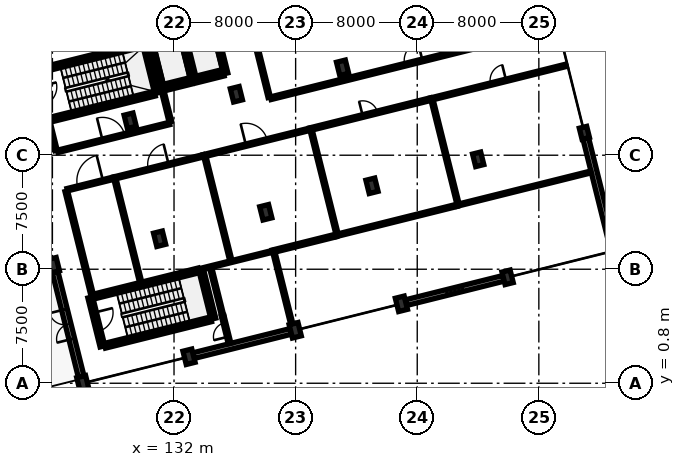
"""IFC4 building model, lengths in metres.
Left out: names, types, materials, properties, quantities, classifications, styles, units other than length and angle.
Written with IfcOpenShell. Run it as: python <this file> out.ifc"""

import sys

from ifc_helpers import new_model, si_unit, direction, frame, frame_2d, origin, origin_2d, place, context, subcontext, project, spatial, rectangle, extrude, element, fill, save


model = new_model("IFC4")
c1 = context("Model", 3, precision=1e-05, world=origin(), true_north=direction((0.0, 1.0)))
c2 = subcontext(c1, "Body", "Model", "MODEL_VIEW")
j1 = project(units=[si_unit("LENGTHUNIT", "METRE"), si_unit("PLANEANGLEUNIT", "RADIAN")], contexts=[c1])
p1 = place(None, origin())
s1 = spatial("IfcSite", under=j1, at=p1, CompositionType="ELEMENT")
p2 = place(p1, origin())
s2 = spatial("IfcBuilding", under=s1, at=p2, CompositionType="ELEMENT")
p3 = place(p2, origin())
s3 = spatial("IfcBuildingStorey", under=s2, at=p3, CompositionType="ELEMENT", Elevation=0.0)
for number, where, z_axis, x_axis in (
    (1, (126.0, 0.8, 0.0), (0.0, 0.0, 1.0), (0.97, 0.242, 0.0)),
    (2, (124.065, 8.562, 0.0), (0.0, 0.0, 1.0), (0.97, 0.242, 0.0)),
    (3, (132.986, 2.542, 0.0), (0.0, 0.0, 1.0), (0.97, 0.242, 0.0)),
    (4, (131.051, 10.304, 0.0), (0.0, 0.0, 1.0), (0.97, 0.242, 0.0)),
    (5, (129.115, 18.067, 0.0), (0.0, 0.0, 1.0), (0.97, 0.242, 0.0)),
    (6, (139.972, 4.284, 0.0), (0.0, 0.0, 1.0), (0.97, 0.242, 0.0)),
    (7, (138.037, 12.046, 0.0), (0.0, 0.0, 1.0), (0.97, 0.242, 0.0)),
    (8, (136.102, 19.808, 0.0), (0.0, 0.0, 1.0), (0.97, 0.242, 0.0)),
    (9, (146.958, 6.026, 0.0), (0.0, 0.0, 1.0), (0.97, 0.242, 0.0)),
    (10, (145.023, 13.788, 0.0), (0.0, 0.0, 1.0), (0.97, 0.242, 0.0)),
    (11, (143.088, 21.55, 0.0), (0.0, 0.0, 1.0), (0.97, 0.242, 0.0)),
):
    element("IfcColumn", number, at=place(p3, frame(where, z_axis=z_axis, x_axis=x_axis)), inside=s3, PredefinedType="COLUMN", context=c2, shape_type="SweptSolid", body=[
        extrude(rectangle(XDim=0.6, YDim=0.9, at=origin_2d()), origin(), (0.0, 0.0, 1.0), 4.7),
    ])
for number, where, z_axis, x_axis in (
    (12, (153.945, 7.767, 0.0), (0.0, 0.0, 1.0), (0.97, 0.242, 0.0)),
    (13, (152.009, 15.53, 0.0), (0.0, 0.0, 1.0), (0.97, 0.242, 0.0)),
):
    element("IfcColumn", number, at=place(p3, frame(where, z_axis=z_axis, x_axis=x_axis)), inside=s3, PredefinedType="COLUMN", context=c2, shape_type="SweptSolid", body=[
        extrude(rectangle(XDim=0.55, YDim=0.85, at=origin_2d()), origin(), (0.0, 0.0, 1.0), 4.7),
    ])
p4 = place(p3, frame((158.995, 17.271, 0.0), z_axis=(0.0, 0.0, 1.0), x_axis=(0.970295726276, 0.2419218956, 0.0)))
e14 = element("IfcColumn", 14, at=p4, inside=s3, PredefinedType="COLUMN", context=c2, shape_type="SweptSolid", body=[
    extrude(rectangle(XDim=0.5, YDim=0.75, at=origin_2d()), origin(), (0.0, 0.0, 1.0), 4.7),
])
p5 = place(p3, frame((159.086, 16.908, 0.0), z_axis=(0.0, 0.0, 1.0), x_axis=(0.241917549853, -0.970296809782, 0.0)))
e15 = element("IfcWall", 15, at=p5, inside=s3, PredefinedType="SOLIDWALL", context=c2, shape_type="SweptSolid", body=[
    extrude(rectangle(XDim=7.25, YDim=0.38, at=frame_2d((3.625, 0.0))), origin(), (0.0, 0.0, 1.0), 3.985),
])
p6 = place(p3, frame((153.678, 7.701, 0.0), z_axis=(0.0, 0.0, 1.0), x_axis=(-0.970294050816, -0.241928615405, 0.0)))
e16 = element("IfcWall", 16, at=p6, inside=s3, PredefinedType="SOLIDWALL", context=c2, shape_type="SweptSolid", body=[
    extrude(rectangle(XDim=6.625, YDim=0.38, at=frame_2d((3.312, 0.0))), origin(), (0.0, 0.0, 1.0), 3.885),
])
p7 = place(p6, frame((2.762, 0.0, 0.9)))
e17 = element("IfcOpeningElement", 17, at=p7, cuts=e16, PredefinedType="OPENING", context=c2, shape_type="SweptSolid", body=[
    extrude(rectangle(XDim=1.1, YDim=1.9, at=frame_2d((0.55, 0.95))), frame((0.0, 0.202, 0.0), z_axis=(0.0, -1.0, 0.0), x_axis=(1.0, 0.0, 0.0)), (0.0, 0.0, 1.0), 0.404),
])
p8 = place(p3, frame((139.681, 4.211, 0.0), z_axis=(0.0, 0.0, 1.0), x_axis=(-0.970296792907, -0.241917617537, 0.0)))
e18 = element("IfcWall", 18, at=p8, inside=s3, PredefinedType="SOLIDWALL", context=c2, shape_type="SweptSolid", body=[
    extrude(rectangle(XDim=6.6, YDim=0.38, at=frame_2d((3.3, 0.0))), origin(), (0.0, 0.0, 1.0), 3.885),
])
p9 = place(p3, frame((125.891, 1.237, 0.0), z_axis=(0.0, 0.0, 1.0), x_axis=(-0.241904492141, 0.97030006528, 0.0)))
e19 = element("IfcWall", 19, at=p9, inside=s3, PredefinedType="SOLIDWALL", context=c2, shape_type="SweptSolid", body=[
    extrude(rectangle(XDim=7.1, YDim=0.38, at=frame_2d((3.55, 0.0))), origin(), (0.0, 0.0, 1.0), 3.985),
])
p10 = place(p9, frame((2.55, 0.0, 0.0)))
e20 = element("IfcOpeningElement", 20, at=p10, cuts=e19, PredefinedType="OPENING", context=c2, shape_type="SweptSolid", body=[
    extrude(rectangle(XDim=2.0, YDim=2.35, at=frame_2d((1.0, 1.175))), frame((0.0, 0.202, 0.0), z_axis=(0.0, -1.0, 0.0), x_axis=(1.0, 0.0, 0.0)), (0.0, 0.0, 1.0), 0.404),
])
p11 = place(p3, frame((123.75, 18.11, 0.0), z_axis=(0.0, 0.0, 1.0), x_axis=(0.970294108333, 0.241928384724, 0.0)))
e21 = element("IfcWall", 21, at=p11, inside=s3, PredefinedType="SHEAR", context=c2, shape_type="SweptSolid", body=[
    extrude(rectangle(XDim=7.19, YDim=0.32, at=frame_2d((3.595, 0.0))), origin(), (0.0, 0.0, 1.0), 4.7),
])
p12 = place(p3, frame((130.887, 19.889, 0.0), z_axis=(0.0, 0.0, 1.0), x_axis=(-0.241947258837, 0.970289402158, 0.0)))
e22 = element("IfcWall", 22, at=p12, inside=s3, PredefinedType="SHEAR", context=c2, shape_type="SweptSolid", body=[
    extrude(rectangle(XDim=3.32, YDim=0.32, at=frame_2d((1.66, 0.0))), origin(), (0.0, 0.0, 1.0), 4.7),
])
p13 = place(p3, frame((129.924, 23.071, 0.0), z_axis=(0.0, 0.0, 1.0), x_axis=(-0.970294108333, -0.241928384724, 0.0)))
e23 = element("IfcWall", 23, at=p13, inside=s3, PredefinedType="SHEAR", context=c2, shape_type="SweptSolid", body=[
    extrude(rectangle(XDim=7.19, YDim=0.32, at=frame_2d((3.595, 0.0))), origin(), (0.0, 0.0, 1.0), 4.7),
])
p14 = place(p3, frame((131.363, 20.176, 0.0), z_axis=(0.0, 0.0, 1.0), x_axis=(0.970284587517, 0.241966566341, 0.0)))
e24 = element("IfcWall", 24, at=p14, inside=s3, PredefinedType="SHEAR", context=c2, shape_type="SweptSolid", body=[
    extrude(rectangle(XDim=1.817, YDim=0.28, at=frame_2d((0.909, 0.0))), origin(), (0.0, 0.0, 1.0), 4.7),
])
for number, where, z_axis, x_axis in (
    (25, (133.267, 20.651, 0.0), (0.0, 0.0, 1.0), (-0.242, 0.97, 0.0)),
    (26, (130.498, 23.046, 0.0), (0.0, 0.0, 1.0), (0.242, -0.97, 0.0)),
):
    element("IfcWall", number, at=place(p3, frame(where, z_axis=z_axis, x_axis=x_axis)), inside=s3, PredefinedType="SHEAR", context=c2, shape_type="SweptSolid", body=[
        extrude(rectangle(XDim=2.994, YDim=0.28, at=frame_2d((1.497, 0.0))), origin(), (0.0, 0.0, 1.0), 4.7),
    ])
p15 = place(p3, frame((133.408, 20.686, 0.0), z_axis=(0.0, 0.0, 1.0), x_axis=(0.970285190026, 0.241964150272, 0.0)))
e27 = element("IfcWall", 27, at=p15, inside=s3, PredefinedType="SHEAR", context=c2, shape_type="SweptSolid", body=[
    extrude(rectangle(XDim=1.91, YDim=0.28, at=frame_2d((0.955, 0.0))), origin(), (0.0, 0.0, 1.0), 4.7),
])
p16 = place(p3, frame((135.402, 21.183, 0.0), z_axis=(0.0, 0.0, 1.0), x_axis=(-0.241921647353, 0.970295788171, 0.0)))
e28 = element("IfcWall", 28, at=p16, inside=s3, PredefinedType="SHEAR", context=c2, shape_type="SweptSolid", body=[
    extrude(rectangle(XDim=2.994, YDim=0.28, at=frame_2d((1.497, 0.0))), origin(), (0.0, 0.0, 1.0), 4.7),
])
p17 = place(p3, frame((127.452, 3.264, 0.0), z_axis=(0.0, 0.0, 1.0), x_axis=(0.970294108333, 0.241928384724, 0.0)))
e29 = element("IfcWall", 29, at=p17, inside=s3, PredefinedType="SHEAR", context=c2, shape_type="SweptSolid", body=[
    extrude(rectangle(XDim=7.19, YDim=0.32, at=frame_2d((3.595, 0.0))), origin(), (0.0, 0.0, 1.0), 4.7),
])
p18 = place(p3, frame((134.588, 5.044, 0.0), z_axis=(0.0, 0.0, 1.0), x_axis=(-0.241929995817, 0.970293706629, 0.0)))
e30 = element("IfcWall", 30, at=p18, inside=s3, PredefinedType="SHEAR", context=c2, shape_type="SweptSolid", body=[
    extrude(rectangle(XDim=3.32, YDim=0.32, at=frame_2d((1.66, 0.0))), origin(), (0.0, 0.0, 1.0), 4.7),
])
p19 = place(p3, frame((133.625, 8.225, 0.0), z_axis=(0.0, 0.0, 1.0), x_axis=(-0.970294108333, -0.241928384724, 0.0)))
e31 = element("IfcWall", 31, at=p19, inside=s3, PredefinedType="SHEAR", context=c2, shape_type="SweptSolid", body=[
    extrude(rectangle(XDim=7.19, YDim=0.32, at=frame_2d((3.595, 0.0))), origin(), (0.0, 0.0, 1.0), 4.7),
])
p20 = place(p3, frame((126.489, 6.446, 0.0), z_axis=(0.0, 0.0, 1.0), x_axis=(0.241947258837, -0.970289402158, 0.0)))
e32 = element("IfcWall", 32, at=p20, inside=s3, PredefinedType="SHEAR", context=c2, shape_type="SweptSolid", body=[
    extrude(rectangle(XDim=3.32, YDim=0.32, at=frame_2d((1.66, 0.0))), origin(), (0.0, 0.0, 1.0), 4.7),
])
p21 = place(p20, frame((1.035, 0.0, 0.0)))
e33 = element("IfcOpeningElement", 33, at=p21, cuts=e32, PredefinedType="OPENING", context=c2, shape_type="SweptSolid", body=[
    extrude(rectangle(XDim=1.25, YDim=2.2, at=frame_2d((0.625, 1.1))), frame((0.0, 0.172, 0.0), z_axis=(0.0, -1.0, 0.0), x_axis=(1.0, 0.0, 0.0)), (0.0, 0.0, 1.0), 0.344),
])
p22 = place(p3, frame((124.346, 16.053, 0.0), z_axis=(0.0, 0.0, 1.0), x_axis=(0.970295772287, 0.241921711059, 0.0)))
e34 = element("IfcWall", 34, at=p22, inside=s3, PredefinedType="PARTITIONING", context=c2, shape_type="SweptSolid", body=[
    extrude(rectangle(XDim=7.58, YDim=0.16, at=frame_2d((3.79, 0.0))), origin(), (0.0, 0.0, 1.0), 3.885),
])
p23 = place(p22, frame((3.04, 0.0, 0.0)))
e35 = element("IfcOpeningElement", 35, at=p23, cuts=e34, PredefinedType="OPENING", context=c2, shape_type="SweptSolid", body=[
    extrude(rectangle(XDim=1.5, YDim=2.28, at=frame_2d((0.75, 1.14))), frame((0.0, 0.092, 0.0), z_axis=(0.0, -1.0, 0.0), x_axis=(1.0, 0.0, 0.0)), (0.0, 0.0, 1.0), 0.184),
])
p24 = place(p3, frame((135.654, 3.415, 0.0), z_axis=(0.0, 0.0, 1.0), x_axis=(-0.2419188687, 0.970296480962, 0.0)))
e36 = element("IfcWall", 36, at=p24, inside=s3, PredefinedType="PARTITIONING", context=c2, shape_type="SweptSolid", body=[
    extrude(rectangle(XDim=1.863, YDim=0.18, at=frame_2d((0.932, 0.0))), origin(), (0.0, 0.0, 1.0), 4.035),
])
p25 = place(p24, frame((0.457, 0.0, 0.0)))
e37 = element("IfcOpeningElement", 37, at=p25, cuts=e36, PredefinedType="OPENING", context=c2, shape_type="SweptSolid", body=[
    extrude(rectangle(XDim=0.95, YDim=2.15, at=frame_2d((0.475, 1.075))), frame((0.0, 0.102, 0.0), z_axis=(0.0, -1.0, 0.0), x_axis=(1.0, 0.0, 0.0)), (0.0, 0.0, 1.0), 0.204),
])
p26 = place(p3, frame((124.975, 13.53, 0.0), z_axis=(0.0, 0.0, 1.0), x_axis=(0.970289141252, 0.241948305158, 0.0)))
e38 = element("IfcWall", 38, at=p26, inside=s3, PredefinedType="PARTITIONING", context=c2, shape_type="SweptSolid", body=[
    extrude(rectangle(XDim=3.13, YDim=0.16, at=frame_2d((1.565, 0.0))), origin(), (0.0, 0.0, 1.0), 4.7),
])
p27 = place(p26, frame((0.705, 0.0, 0.0)))
e39 = element("IfcOpeningElement", 39, at=p27, cuts=e38, PredefinedType="OPENING", context=c2, shape_type="SweptSolid", body=[
    extrude(rectangle(XDim=1.72, YDim=2.34, at=frame_2d((0.86, 1.17))), frame((0.0, 0.092, 0.0), z_axis=(0.0, -1.0, 0.0), x_axis=(1.0, 0.0, 0.0)), (0.0, 0.0, 1.0), 0.184),
])
p28 = place(p3, frame((128.023, 14.29, 0.0), z_axis=(0.0, 0.0, 1.0), x_axis=(0.970293282145, 0.241931698263, 0.0)))
e40 = element("IfcWall", 40, at=p28, inside=s3, PredefinedType="PARTITIONING", context=c2, shape_type="SweptSolid", body=[
    extrude(rectangle(XDim=6.088, YDim=0.16, at=frame_2d((3.044, 0.0))), origin(), (0.0, 0.0, 1.0), 3.885),
])
p29 = place(p28, frame((2.354, 0.0, 0.0)))
e41 = element("IfcOpeningElement", 41, at=p29, cuts=e40, PredefinedType="OPENING", context=c2, shape_type="SweptSolid", body=[
    extrude(rectangle(XDim=1.38, YDim=2.3, at=frame_2d((0.69, 1.15))), frame((0.0, 0.092, 0.0), z_axis=(0.0, -1.0, 0.0), x_axis=(1.0, 0.0, 0.0)), (0.0, 0.0, 1.0), 0.184),
])
p30 = place(p3, frame((133.942, 15.766, 0.0), z_axis=(0.0, 0.0, 1.0), x_axis=(0.970292162734, 0.241936187739, 0.0)))
e42 = element("IfcWall", 42, at=p30, inside=s3, PredefinedType="PARTITIONING", context=c2, shape_type="SweptSolid", body=[
    extrude(rectangle(XDim=7.188, YDim=0.16, at=frame_2d((3.594, 0.0))), origin(), (0.0, 0.0, 1.0), 3.885),
])
p31 = place(p30, frame((2.874, 0.0, 0.0)))
e43 = element("IfcOpeningElement", 43, at=p31, cuts=e42, PredefinedType="OPENING", context=c2, shape_type="SweptSolid", body=[
    extrude(rectangle(XDim=1.44, YDim=2.32, at=frame_2d((0.72, 1.16))), frame((0.0, 0.092, 0.0), z_axis=(0.0, -1.0, 0.0), x_axis=(1.0, 0.0, 0.0)), (0.0, 0.0, 1.0), 0.184),
])
p32 = place(p3, frame((140.928, 17.508, 0.0), z_axis=(0.0, 0.0, 1.0), x_axis=(0.970293149657, 0.241932229621, 0.0)))
e44 = element("IfcWall", 44, at=p32, inside=s3, PredefinedType="PARTITIONING", context=c2, shape_type="SweptSolid", body=[
    extrude(rectangle(XDim=8.188, YDim=0.18, at=frame_2d((4.094, 0.0))), origin(), (0.0, 0.0, 1.0), 3.885),
])
p33 = place(p32, frame((3.594, 0.0, 0.0)))
e45 = element("IfcOpeningElement", 45, at=p33, cuts=e44, PredefinedType="OPENING", context=c2, shape_type="SweptSolid", body=[
    extrude(rectangle(XDim=1.0, YDim=2.15, at=frame_2d((0.5, 1.075))), frame((0.0, 0.102, 0.0), z_axis=(0.0, -1.0, 0.0), x_axis=(1.0, 0.0, 0.0)), (0.0, 0.0, 1.0), 0.204),
])
p34 = place(p3, frame((148.885, 19.491, 0.0), z_axis=(0.0, 0.0, 1.0), x_axis=(0.970294203895, 0.241928001454, 0.0)))
e46 = element("IfcWall", 46, at=p34, inside=s3, PredefinedType="PARTITIONING", context=c2, shape_type="SweptSolid", body=[
    extrude(rectangle(XDim=9.171, YDim=0.16, at=frame_2d((4.585, 0.0))), origin(), (0.0, 0.0, 1.0), 3.885),
])
p35 = place(p34, frame((4.061, 0.0, 0.0)))
e47 = element("IfcOpeningElement", 47, at=p35, cuts=e46, PredefinedType="OPENING", context=c2, shape_type="SweptSolid", body=[
    extrude(rectangle(XDim=1.05, YDim=2.15, at=frame_2d((0.525, 1.075))), frame((0.0, 0.092, 0.0), z_axis=(0.0, -1.0, 0.0), x_axis=(1.0, 0.0, 0.0)), (0.0, 0.0, 1.0), 0.184),
])
p36 = place(p3, frame((138.367, 19.549, 0.0), z_axis=(0.0, 0.0, 1.0), x_axis=(0.970295834183, 0.241921462809, 0.0)))
e48 = element("IfcWall", 48, at=p36, inside=s3, PredefinedType="PARTITIONING", context=c2, shape_type="SweptSolid", body=[
    extrude(rectangle(XDim=19.363, YDim=0.18, at=frame_2d((9.682, 0.0))), origin(), (0.0, 0.0, 1.0), 3.885),
])
p37 = place(p36, frame((9.082, 0.0, 0.0)))
e49 = element("IfcOpeningElement", 49, at=p37, cuts=e48, PredefinedType="OPENING", context=c2, shape_type="SweptSolid", body=[
    extrude(rectangle(XDim=1.2, YDim=2.15, at=frame_2d((0.6, 1.075))), frame((0.0, 0.102, 0.0), z_axis=(0.0, -1.0, 0.0), x_axis=(1.0, 0.0, 0.0)), (0.0, 0.0, 1.0), 0.204),
])
p38 = place(p3, frame((124.243, 16.115, 0.0), z_axis=(0.0, 0.0, 1.0), x_axis=(-0.24202255973, 0.970270622343, 0.0)))
e50 = element("IfcWall", 50, at=p38, inside=s3, PredefinedType="PARTITIONING", context=c2, shape_type="SweptSolid", body=[
    extrude(rectangle(XDim=1.792, YDim=0.15, at=frame_2d((0.896, 0.0))), origin(), (0.0, 0.0, 1.0), 3.985),
])
p39 = place(p3, frame((131.763, 17.99, 0.0), z_axis=(0.0, 0.0, 1.0), x_axis=(-0.241962612769, 0.970285573438, 0.0)))
e51 = element("IfcWall", 51, at=p39, inside=s3, PredefinedType="PARTITIONING", context=c2, shape_type="SweptSolid", body=[
    extrude(rectangle(XDim=2.206, YDim=0.18, at=frame_2d((1.103, 0.0))), origin(), (0.0, 0.0, 1.0), 3.985),
])
p40 = place(p3, frame((133.627, 8.267, 0.0), z_axis=(0.0, 0.0, 1.0), x_axis=(0.970303519327, 0.241890637233, 0.0)))
e52 = element("IfcWall", 52, at=p40, inside=s3, PredefinedType="PARTITIONING", context=c2, shape_type="SweptSolid", body=[
    extrude(rectangle(XDim=4.988, YDim=0.125, at=frame_2d((2.494, 0.0))), origin(), (0.0, 0.0, 1.0), 2.3),
])
p41 = place(p3, frame((135.2, 5.235, 0.0), z_axis=(0.0, 0.0, 1.0), x_axis=(-0.241934312689, 0.970292630263, 0.0)))
e53 = element("IfcWall", 53, at=p41, inside=s3, PredefinedType="PARTITIONING", context=c2, shape_type="SweptSolid", body=[
    extrude(rectangle(XDim=3.248, YDim=0.15, at=frame_2d((1.624, 0.0))), origin(), (0.0, 0.0, 1.0), 4.7),
])
p42 = place(p3, frame((139.766, 4.615, 0.0), z_axis=(0.0, 0.0, 1.0), x_axis=(-0.241908041606, 0.970299180359, 0.0)))
e54 = element("IfcWall", 54, at=p42, inside=s3, PredefinedType="PARTITIONING", context=c2, shape_type="SweptSolid", body=[
    extrude(rectangle(XDim=4.943, YDim=0.15, at=frame_2d((2.472, 0.0))), origin(), (0.0, 0.0, 1.0), 3.885),
])
p43 = place(p3, frame((126.58, 6.74, 0.0), z_axis=(0.0, 0.0, 1.0), x_axis=(-0.24192707633, 0.97029443456, 0.0)))
e55 = element("IfcWall", 55, at=p43, inside=s3, PredefinedType="PARTITIONING", context=c2, shape_type="SweptSolid", body=[
    extrude(rectangle(XDim=6.892, YDim=0.18, at=frame_2d((3.446, 0.0))), origin(), (0.0, 0.0, 1.0), 3.985),
])
p44 = place(p3, frame((129.804, 7.45, 0.0), z_axis=(0.0, 0.0, 1.0), x_axis=(-0.241901504068, 0.970300810228, 0.0)))
e56 = element("IfcWall", 56, at=p44, inside=s3, PredefinedType="PARTITIONING", context=c2, shape_type="SweptSolid", body=[
    extrude(rectangle(XDim=6.976, YDim=0.15, at=frame_2d((3.488, 0.0))), origin(), (0.0, 0.0, 1.0), 3.985),
])
p45 = place(p3, frame((135.737, 8.87, 0.0), z_axis=(0.0, 0.0, 1.0), x_axis=(-0.241939357675, 0.970291372325, 0.0)))
e57 = element("IfcWall", 57, at=p45, inside=s3, PredefinedType="PARTITIONING", context=c2, shape_type="SweptSolid", body=[
    extrude(rectangle(XDim=7.033, YDim=0.15, at=frame_2d((3.517, 0.0))), origin(), (0.0, 0.0, 1.0), 3.985),
])
p46 = place(p3, frame((138.479, 9.477, 0.0), z_axis=(0.0, 0.0, 1.0), x_axis=(0.970295647322, 0.241922212266, 0.0)))
e58 = element("IfcWall", 58, at=p46, inside=s3, PredefinedType="PARTITIONING", context=c2, shape_type="SweptSolid", body=[
    extrude(rectangle(XDim=4.308, YDim=0.18, at=frame_2d((2.154, 0.0))), origin(), (0.0, 0.0, 1.0), 3.885),
])
p47 = place(p3, frame((142.72, 10.622, 0.0), z_axis=(0.0, 0.0, 1.0), x_axis=(-0.241913043167, 0.970297933393, 0.0)))
e59 = element("IfcWall", 59, at=p47, inside=s3, PredefinedType="PARTITIONING", context=c2, shape_type="SweptSolid", body=[
    extrude(rectangle(XDim=7.013, YDim=0.15, at=frame_2d((3.506, 0.0))), origin(), (0.0, 0.0, 1.0), 3.985),
])
p48 = place(p3, frame((142.67, 10.522, 0.0), z_axis=(0.0, 0.0, 1.0), x_axis=(0.970298403727, 0.241911156677, 0.0)))
e60 = element("IfcWall", 60, at=p48, inside=s3, PredefinedType="PARTITIONING", context=c2, shape_type="SweptSolid", body=[
    extrude(rectangle(XDim=8.188, YDim=0.15, at=frame_2d((4.094, 0.0))), origin(), (0.0, 0.0, 1.0), 3.885),
])
p49 = place(p3, frame((150.677, 12.605, 0.0), z_axis=(0.0, 0.0, 1.0), x_axis=(-0.241913935588, 0.970297710895, 0.0)))
e61 = element("IfcWall", 61, at=p49, inside=s3, PredefinedType="PARTITIONING", context=c2, shape_type="SweptSolid", body=[
    extrude(rectangle(XDim=7.023, YDim=0.15, at=frame_2d((3.511, 0.0))), origin(), (0.0, 0.0, 1.0), 3.985),
])
p50 = place(p3, frame((150.627, 12.505, 0.0), z_axis=(0.0, 0.0, 1.0), x_axis=(0.970292717865, 0.241933961357, 0.0)))
e62 = element("IfcWall", 62, at=p50, inside=s3, PredefinedType="PARTITIONING", context=c2, shape_type="SweptSolid", body=[
    extrude(rectangle(XDim=9.071, YDim=0.125, at=frame_2d((4.536, 0.0))), origin(), (0.0, 0.0, 1.0), 3.885),
])
p51 = place(p3, frame((138.264, 19.611, 0.0), z_axis=(0.0, 0.0, 1.0), x_axis=(-0.241920353256, 0.970296110824, 0.0)))
e63 = element("IfcWall", 63, at=p51, inside=s3, PredefinedType="PARTITIONING", context=c2, shape_type="SweptSolid", body=[
    extrude(rectangle(XDim=8.03, YDim=0.16, at=frame_2d((4.015, 0.0))), origin(), (0.0, 0.0, 1.0), 3.985),
])
p52 = place(p7, origin())
e64 = element("IfcWindow", 64, at=p52, inside=s3, PartitioningType="SINGLE_PANEL", PredefinedType="WINDOW", context=c2, shape_type="SweptSolid", body=[
    extrude(rectangle(XDim=1.1, YDim=1.9, at=frame_2d((0.55, 0.95))), frame((0.0, 0.03, 0.0), z_axis=(0.0, -1.0, 0.0), x_axis=(1.0, 0.0, 0.0)), (0.0, 0.0, 1.0), 0.06),
])
fill(e17, e64)
p53 = place(p10, origin())
e65 = element("IfcDoor", 65, at=p53, inside=s3, OperationType="DOUBLE_DOOR_SINGLE_SWING", PredefinedType="DOOR", context=c2, shape_type="SweptSolid", body=[
    extrude(rectangle(XDim=2.0, YDim=2.35, at=frame_2d((1.0, 1.175))), frame((0.0, 0.025, 0.0), z_axis=(0.0, -1.0, 0.0), x_axis=(1.0, 0.0, 0.0)), (0.0, 0.0, 1.0), 0.05),
])
fill(e20, e65)
p54 = place(p21, origin())
e66 = element("IfcDoor", 66, at=p54, inside=s3, OperationType="SINGLE_SWING_LEFT", PredefinedType="DOOR", context=c2, shape_type="SweptSolid", body=[
    extrude(rectangle(XDim=1.25, YDim=2.2, at=frame_2d((0.625, 1.1))), frame((0.0, 0.025, 0.0), z_axis=(0.0, -1.0, 0.0), x_axis=(1.0, 0.0, 0.0)), (0.0, 0.0, 1.0), 0.05),
])
fill(e33, e66)
p55 = place(p23, origin())
e67 = element("IfcDoor", 67, at=p55, inside=s3, OperationType="SINGLE_SWING_LEFT", PredefinedType="DOOR", context=c2, shape_type="SweptSolid", body=[
    extrude(rectangle(XDim=1.5, YDim=2.28, at=frame_2d((0.75, 1.14))), frame((0.0, 0.025, 0.0), z_axis=(0.0, -1.0, 0.0), x_axis=(1.0, 0.0, 0.0)), (0.0, 0.0, 1.0), 0.05),
])
fill(e35, e67)
p56 = place(p25, origin())
e68 = element("IfcDoor", 68, at=p56, inside=s3, OperationType="SINGLE_SWING_LEFT", PredefinedType="DOOR", context=c2, shape_type="SweptSolid", body=[
    extrude(rectangle(XDim=0.95, YDim=2.15, at=frame_2d((0.475, 1.075))), frame((0.0, 0.025, 0.0), z_axis=(0.0, -1.0, 0.0), x_axis=(1.0, 0.0, 0.0)), (0.0, 0.0, 1.0), 0.05),
])
fill(e37, e68)
p57 = place(p27, origin())
e69 = element("IfcDoor", 69, at=p57, inside=s3, OperationType="SINGLE_SWING_RIGHT", PredefinedType="DOOR", context=c2, shape_type="SweptSolid", body=[
    extrude(rectangle(XDim=1.72, YDim=2.34, at=frame_2d((0.86, 1.17))), frame((0.0, 0.025, 0.0), z_axis=(0.0, -1.0, 0.0), x_axis=(1.0, 0.0, 0.0)), (0.0, 0.0, 1.0), 0.05),
])
fill(e39, e69)
p58 = place(p29, origin())
e70 = element("IfcDoor", 70, at=p58, inside=s3, OperationType="SINGLE_SWING_RIGHT", PredefinedType="DOOR", context=c2, shape_type="SweptSolid", body=[
    extrude(rectangle(XDim=1.38, YDim=2.3, at=frame_2d((0.69, 1.15))), frame((0.0, 0.025, 0.0), z_axis=(0.0, -1.0, 0.0), x_axis=(1.0, 0.0, 0.0)), (0.0, 0.0, 1.0), 0.05),
])
fill(e41, e70)
p59 = place(p31, origin())
e71 = element("IfcDoor", 71, at=p59, inside=s3, OperationType="SINGLE_SWING_LEFT", PredefinedType="DOOR", context=c2, shape_type="SweptSolid", body=[
    extrude(rectangle(XDim=1.44, YDim=2.32, at=frame_2d((0.72, 1.16))), frame((0.0, 0.025, 0.0), z_axis=(0.0, -1.0, 0.0), x_axis=(1.0, 0.0, 0.0)), (0.0, 0.0, 1.0), 0.05),
])
fill(e43, e71)
p60 = place(p33, origin())
e72 = element("IfcDoor", 72, at=p60, inside=s3, OperationType="SINGLE_SWING_LEFT", PredefinedType="DOOR", context=c2, shape_type="SweptSolid", body=[
    extrude(rectangle(XDim=1.0, YDim=2.15, at=frame_2d((0.5, 1.075))), frame((0.0, 0.025, 0.0), z_axis=(0.0, -1.0, 0.0), x_axis=(1.0, 0.0, 0.0)), (0.0, 0.0, 1.0), 0.05),
])
fill(e45, e72)
p61 = place(p35, origin())
e73 = element("IfcDoor", 73, at=p61, inside=s3, OperationType="SINGLE_SWING_RIGHT", PredefinedType="DOOR", context=c2, shape_type="SweptSolid", body=[
    extrude(rectangle(XDim=1.05, YDim=2.15, at=frame_2d((0.525, 1.075))), frame((0.0, 0.025, 0.0), z_axis=(0.0, -1.0, 0.0), x_axis=(1.0, 0.0, 0.0)), (0.0, 0.0, 1.0), 0.05),
])
fill(e47, e73)
p62 = place(p37, origin())
e74 = element("IfcDoor", 74, at=p62, inside=s3, OperationType="SINGLE_SWING_RIGHT", PredefinedType="DOOR", context=c2, shape_type="SweptSolid", body=[
    extrude(rectangle(XDim=1.2, YDim=2.15, at=frame_2d((0.6, 1.075))), frame((0.0, 0.025, 0.0), z_axis=(0.0, -1.0, 0.0), x_axis=(1.0, 0.0, 0.0)), (0.0, 0.0, 1.0), 0.05),
])
fill(e49, e74)
save(model, sys.argv[1])
